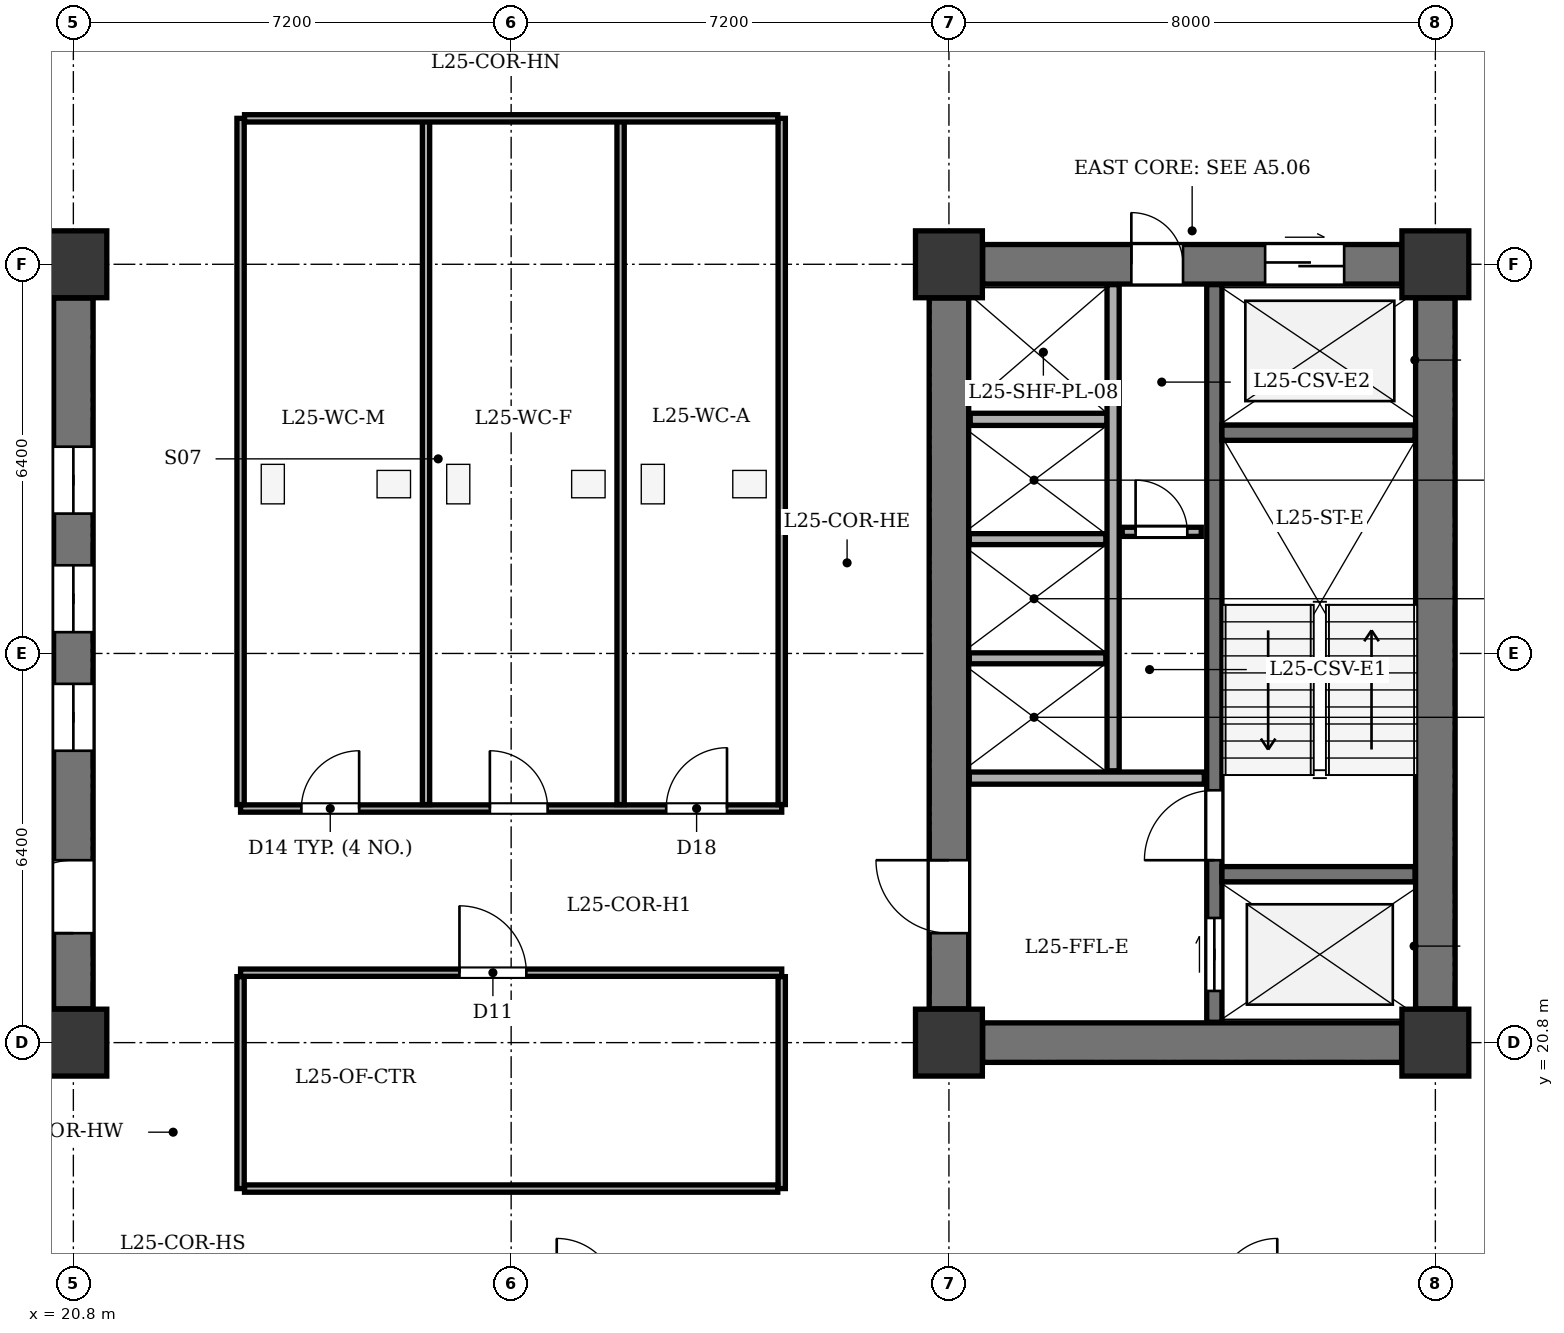
"""IFC4 building model, lengths in metres.
Left out: names, types, materials, properties, quantities, classifications, styles, units other than length and angle.
Written with IfcOpenShell. Run it as: python <this file> out.ifc"""

import sys

from ifc_helpers import new_model, si_unit, direction, frame, frame_2d, origin, origin_2d, place, context, subcontext, project, spatial, rectangle, extrude, element, fill, save


model = new_model("IFC4")
c1 = context("Model", 3, precision=1e-05, world=origin(), true_north=direction((0.0, 1.0)))
c2 = subcontext(c1, "Body", "Model", "MODEL_VIEW")
j1 = project(units=[si_unit("LENGTHUNIT", "METRE"), si_unit("PLANEANGLEUNIT", "RADIAN")], contexts=[c1])
p1 = place(None, origin())
s1 = spatial("IfcSite", under=j1, at=p1, CompositionType="ELEMENT")
p2 = place(p1, origin())
s2 = spatial("IfcBuilding", under=s1, at=p2, CompositionType="ELEMENT")
p3 = place(p2, frame((0.0, 0.0, 102.3)))
s3 = spatial("IfcBuildingStorey", under=s2, at=p3, CompositionType="ELEMENT", Elevation=102.3)
for number, where, z_axis, x_axis in (
    (1, (20.8, 20.8, 0.0), (0.0, 0.0, 1.0), (1.0, 0.0, 0.0)),
    (2, (20.8, 33.6, 0.0), (0.0, 0.0, 1.0), (1.0, 0.0, 0.0)),
    (3, (35.2, 20.8, 0.0), (0.0, 0.0, 1.0), (1.0, 0.0, 0.0)),
    (4, (43.2, 20.8, 0.0), (0.0, 0.0, 1.0), (1.0, 0.0, 0.0)),
    (5, (35.2, 33.6, 0.0), (0.0, 0.0, 1.0), (1.0, 0.0, 0.0)),
    (6, (43.2, 33.6, 0.0), (0.0, 0.0, 1.0), (1.0, 0.0, 0.0)),
):
    element("IfcColumn", number, at=place(p3, frame(where, z_axis=z_axis, x_axis=x_axis)), inside=s3, PredefinedType="COLUMN", context=c2, shape_type="SweptSolid", body=[
        extrude(rectangle(XDim=1.1, YDim=1.1, at=origin_2d()), origin(), (0.0, 0.0, 1.0), 3.9),
    ])
p4 = place(p3, frame((20.8, 21.355, 0.0), z_axis=(0.0, 0.0, 1.0), x_axis=(0.0, 1.0, 0.0)))
e7 = element("IfcWall", 7, at=p4, inside=s3, PredefinedType="SHEAR", context=c2, shape_type="SweptSolid", body=[
    extrude(rectangle(XDim=11.69, YDim=0.65, at=frame_2d((5.845, 0.0))), origin(), (0.0, 0.0, 1.0), 3.6),
])
p5 = place(p4, frame((1.245, 0.0, 0.0)))
e8 = element("IfcOpeningElement", 8, at=p5, cuts=e7, PredefinedType="OPENING", context=c2, shape_type="SweptSolid", body=[
    extrude(rectangle(XDim=1.2, YDim=2.15, at=frame_2d((0.6, 1.075))), frame((0.0, 0.335, 0.0), z_axis=(0.0, -1.0, 0.0), x_axis=(1.0, 0.0, 0.0)), (0.0, 0.0, 1.0), 0.67),
])
p6 = place(p4, frame((4.245, 0.0, 0.0)))
e9 = element("IfcOpeningElement", 9, at=p6, cuts=e7, PredefinedType="OPENING", context=c2, shape_type="SweptSolid", body=[
    extrude(rectangle(XDim=1.1, YDim=2.1, at=frame_2d((0.55, 1.05))), frame((0.0, 0.335, 0.0), z_axis=(0.0, -1.0, 0.0), x_axis=(1.0, 0.0, 0.0)), (0.0, 0.0, 1.0), 0.67),
])
p7 = place(p4, frame((6.195, 0.0, 0.0)))
e10 = element("IfcOpeningElement", 10, at=p7, cuts=e7, PredefinedType="OPENING", context=c2, shape_type="SweptSolid", body=[
    extrude(rectangle(XDim=1.1, YDim=2.1, at=frame_2d((0.55, 1.05))), frame((0.0, 0.335, 0.0), z_axis=(0.0, -1.0, 0.0), x_axis=(1.0, 0.0, 0.0)), (0.0, 0.0, 1.0), 0.67),
])
p8 = place(p4, frame((8.145, 0.0, 0.0)))
e11 = element("IfcOpeningElement", 11, at=p8, cuts=e7, PredefinedType="OPENING", context=c2, shape_type="SweptSolid", body=[
    extrude(rectangle(XDim=1.1, YDim=2.1, at=frame_2d((0.55, 1.05))), frame((0.0, 0.335, 0.0), z_axis=(0.0, -1.0, 0.0), x_axis=(1.0, 0.0, 0.0)), (0.0, 0.0, 1.0), 0.67),
])
p9 = place(p3, frame((16.6, 25.15, 0.0), z_axis=(0.0, 0.0, 1.0), x_axis=(1.0, 0.0, 0.0)))
e12 = element("IfcWall", 12, at=p9, inside=s3, PredefinedType="SOLIDWALL", context=c2, shape_type="SweptSolid", body=[
    extrude(rectangle(XDim=3.865, YDim=0.2, at=frame_2d((1.933, 0.0))), origin(), (0.0, 0.0, 1.0), 3.6),
])
p10 = place(p9, frame((0.3, 0.0, 0.0)))
e13 = element("IfcOpeningElement", 13, at=p10, cuts=e12, PredefinedType="OPENING", context=c2, shape_type="SweptSolid", body=[
    extrude(rectangle(XDim=0.85, YDim=2.02, at=frame_2d((0.425, 1.01))), frame((0.0, 0.11, 0.0), z_axis=(0.0, -1.0, 0.0), x_axis=(1.0, 0.0, 0.0)), (0.0, 0.0, 1.0), 0.22),
])
for number, where, z_axis, x_axis in (
    (14, (18.22, 27.12, 0.0), (0.0, 0.0, 1.0), (1.0, 0.0, 0.0)),
    (15, (18.22, 29.08, 0.0), (0.0, 0.0, 1.0), (1.0, 0.0, 0.0)),
):
    element("IfcWall", number, at=place(p3, frame(where, z_axis=z_axis, x_axis=x_axis)), inside=s3, PredefinedType="PARTITIONING", context=c2, shape_type="SweptSolid", body=[
        extrude(rectangle(XDim=2.245, YDim=0.18, at=frame_2d((1.123, 0.0))), origin(), (0.0, 0.0, 1.0), 3.6),
    ])
p11 = place(p3, frame((43.2, 21.355, 0.0), z_axis=(0.0, 0.0, 1.0), x_axis=(0.0, 1.0, 0.0)))
e16 = element("IfcWall", 16, at=p11, inside=s3, PredefinedType="SHEAR", context=c2, shape_type="SweptSolid", body=[
    extrude(rectangle(XDim=11.69, YDim=0.65, at=frame_2d((5.845, 0.0))), origin(), (0.0, 0.0, 1.0), 3.6),
])
p12 = place(p3, frame((35.755, 20.8, 0.0), z_axis=(0.0, 0.0, 1.0), x_axis=(1.0, 0.0, 0.0)))
e17 = element("IfcWall", 17, at=p12, inside=s3, PredefinedType="SHEAR", context=c2, shape_type="SweptSolid", body=[
    extrude(rectangle(XDim=6.89, YDim=0.65, at=frame_2d((3.445, 0.0))), origin(), (0.0, 0.0, 1.0), 3.6),
])
p13 = place(p3, frame((35.755, 33.6, 0.0), z_axis=(0.0, 0.0, 1.0), x_axis=(1.0, 0.0, 0.0)))
e18 = element("IfcWall", 18, at=p13, inside=s3, PredefinedType="SHEAR", context=c2, shape_type="SweptSolid", body=[
    extrude(rectangle(XDim=6.89, YDim=0.65, at=frame_2d((3.445, 0.0))), origin(), (0.0, 0.0, 1.0), 3.6),
])
p14 = place(p13, frame((4.645, 0.0, 0.0)))
e19 = element("IfcOpeningElement", 19, at=p14, cuts=e18, PredefinedType="OPENING", context=c2, shape_type="SweptSolid", body=[
    extrude(rectangle(XDim=1.3, YDim=2.15, at=frame_2d((0.65, 1.075))), frame((0.0, 0.335, 0.0), z_axis=(0.0, -1.0, 0.0), x_axis=(1.0, 0.0, 0.0)), (0.0, 0.0, 1.0), 0.67),
])
p15 = place(p13, frame((2.445, 0.0, 0.0)))
e20 = element("IfcOpeningElement", 20, at=p15, cuts=e18, PredefinedType="OPENING", context=c2, shape_type="SweptSolid", body=[
    extrude(rectangle(XDim=0.85, YDim=2.02, at=frame_2d((0.425, 1.01))), frame((0.0, 0.335, 0.0), z_axis=(0.0, -1.0, 0.0), x_axis=(1.0, 0.0, 0.0)), (0.0, 0.0, 1.0), 0.67),
])
p16 = place(p3, frame((35.2, 21.355, 0.0), z_axis=(0.0, 0.0, 1.0), x_axis=(0.0, 1.0, 0.0)))
e21 = element("IfcWall", 21, at=p16, inside=s3, PredefinedType="SHEAR", context=c2, shape_type="SweptSolid", body=[
    extrude(rectangle(XDim=11.69, YDim=0.65, at=frame_2d((5.845, 0.0))), origin(), (0.0, 0.0, 1.0), 3.6),
])
p17 = place(p16, frame((1.245, 0.0, 0.0)))
e22 = element("IfcOpeningElement", 22, at=p17, cuts=e21, PredefinedType="OPENING", context=c2, shape_type="SweptSolid", body=[
    extrude(rectangle(XDim=1.2, YDim=2.15, at=frame_2d((0.6, 1.075))), frame((0.0, 0.335, 0.0), z_axis=(0.0, -1.0, 0.0), x_axis=(1.0, 0.0, 0.0)), (0.0, 0.0, 1.0), 0.67),
])
p18 = place(p3, frame((39.565, 21.135, 0.0), z_axis=(0.0, 0.0, 1.0), x_axis=(0.0, 1.0, 0.0)))
e23 = element("IfcWall", 23, at=p18, inside=s3, PredefinedType="SHEAR", context=c2, shape_type="SweptSolid", body=[
    extrude(rectangle(XDim=12.13, YDim=0.25, at=frame_2d((6.065, 0.0))), origin(), (0.0, 0.0, 1.0), 3.6),
])
p19 = place(p18, frame((0.515, 0.0, 0.0)))
e24 = element("IfcOpeningElement", 24, at=p19, cuts=e23, PredefinedType="OPENING", context=c2, shape_type="SweptSolid", body=[
    extrude(rectangle(XDim=1.2, YDim=2.15, at=frame_2d((0.6, 1.075))), frame((0.0, 0.135, 0.0), z_axis=(0.0, -1.0, 0.0), x_axis=(1.0, 0.0, 0.0)), (0.0, 0.0, 1.0), 0.27),
])
p20 = place(p18, frame((2.665, 0.0, 0.0)))
e25 = element("IfcOpeningElement", 25, at=p20, cuts=e23, PredefinedType="OPENING", context=c2, shape_type="SweptSolid", body=[
    extrude(rectangle(XDim=1.15, YDim=2.15, at=frame_2d((0.575, 1.075))), frame((0.0, 0.135, 0.0), z_axis=(0.0, -1.0, 0.0), x_axis=(1.0, 0.0, 0.0)), (0.0, 0.0, 1.0), 0.27),
])
for number, where, z_axis, x_axis in (
    (26, (39.69, 23.57, 0.0), (0.0, 0.0, 1.0), (1.0, 0.0, 0.0)),
    (27, (39.69, 30.83, 0.0), (0.0, 0.0, 1.0), (1.0, 0.0, 0.0)),
):
    element("IfcWall", number, at=place(p3, frame(where, z_axis=z_axis, x_axis=x_axis)), inside=s3, PredefinedType="SHEAR", context=c2, shape_type="SweptSolid", body=[
        extrude(rectangle(XDim=3.175, YDim=0.25, at=frame_2d((1.587, 0.0))), origin(), (0.0, 0.0, 1.0), 3.6),
    ])
p21 = place(p3, frame((35.535, 25.15, 0.0), z_axis=(0.0, 0.0, 1.0), x_axis=(1.0, 0.0, 0.0)))
e28 = element("IfcWall", 28, at=p21, inside=s3, PredefinedType="SOLIDWALL", context=c2, shape_type="SweptSolid", body=[
    extrude(rectangle(XDim=3.865, YDim=0.2, at=frame_2d((1.933, 0.0))), origin(), (0.0, 0.0, 1.0), 3.6),
])
p22 = place(p3, frame((35.55, 31.05, 0.0), z_axis=(0.0, 0.0, 1.0), x_axis=(1.0, 0.0, 0.0)))
e29 = element("IfcWall", 29, at=p22, inside=s3, PredefinedType="SOLIDWALL", context=c2, shape_type="SweptSolid", body=[
    extrude(rectangle(XDim=2.25, YDim=0.2, at=frame_2d((1.125, 0.0))), origin(), (0.0, 0.0, 1.0), 3.6),
])
p23 = place(p3, frame((37.9, 25.27, 0.0), z_axis=(0.0, 0.0, 1.0), x_axis=(0.0, 1.0, 0.0)))
e30 = element("IfcWall", 30, at=p23, inside=s3, PredefinedType="SOLIDWALL", context=c2, shape_type="SweptSolid", body=[
    extrude(rectangle(XDim=7.995, YDim=0.2, at=frame_2d((3.998, 0.0))), origin(), (0.0, 0.0, 1.0), 3.6),
])
for number, where, z_axis, x_axis in (
    (31, (35.535, 27.12, 0.0), (0.0, 0.0, 1.0), (1.0, 0.0, 0.0)),
    (32, (35.535, 29.08, 0.0), (0.0, 0.0, 1.0), (1.0, 0.0, 0.0)),
):
    element("IfcWall", number, at=place(p3, frame(where, z_axis=z_axis, x_axis=x_axis)), inside=s3, PredefinedType="PARTITIONING", context=c2, shape_type="SweptSolid", body=[
        extrude(rectangle(XDim=2.245, YDim=0.18, at=frame_2d((1.123, 0.0))), origin(), (0.0, 0.0, 1.0), 3.6),
    ])
p24 = place(p3, frame((38.05, 29.2, 0.0), z_axis=(0.0, 0.0, 1.0), x_axis=(1.0, 0.0, 0.0)))
e33 = element("IfcWall", 33, at=p24, inside=s3, PredefinedType="PARTITIONING", context=c2, shape_type="SweptSolid", body=[
    extrude(rectangle(XDim=1.3, YDim=0.15, at=frame_2d((0.65, 0.0))), origin(), (0.0, 0.0, 1.0), 3.6),
])
p25 = place(p24, frame((0.22, 0.0, 0.0)))
e34 = element("IfcOpeningElement", 34, at=p25, cuts=e33, PredefinedType="OPENING", context=c2, shape_type="SweptSolid", body=[
    extrude(rectangle(XDim=0.85, YDim=2.02, at=frame_2d((0.425, 1.01))), frame((0.0, 0.085, 0.0), z_axis=(0.0, -1.0, 0.0), x_axis=(1.0, 0.0, 0.0)), (0.0, 0.0, 1.0), 0.17),
])
p26 = place(p3, frame((23.55, 24.65, 0.0), z_axis=(0.0, 0.0, 1.0), x_axis=(1.0, 0.0, 0.0)))
e35 = element("IfcWall", 35, at=p26, inside=s3, PredefinedType="PARTITIONING", context=c2, shape_type="SweptSolid", body=[
    extrude(rectangle(XDim=8.9, YDim=0.12, at=frame_2d((4.45, 0.0))), origin(), (0.0, 0.0, 1.0), 3.135),
])
p27 = place(p26, frame((1.0, 0.0, 0.0)))
e36 = element("IfcOpeningElement", 36, at=p27, cuts=e35, PredefinedType="OPENING", context=c2, shape_type="SweptSolid", body=[
    extrude(rectangle(XDim=0.95, YDim=2.1, at=frame_2d((0.475, 1.05))), frame((0.0, 0.07, 0.0), z_axis=(0.0, -1.0, 0.0), x_axis=(1.0, 0.0, 0.0)), (0.0, 0.0, 1.0), 0.14),
])
p28 = place(p26, frame((4.1, 0.0, 0.0)))
e37 = element("IfcOpeningElement", 37, at=p28, cuts=e35, PredefinedType="OPENING", context=c2, shape_type="SweptSolid", body=[
    extrude(rectangle(XDim=0.95, YDim=2.1, at=frame_2d((0.475, 1.05))), frame((0.0, 0.07, 0.0), z_axis=(0.0, -1.0, 0.0), x_axis=(1.0, 0.0, 0.0)), (0.0, 0.0, 1.0), 0.14),
])
p29 = place(p26, frame((7.0, 0.0, 0.0)))
e38 = element("IfcOpeningElement", 38, at=p29, cuts=e35, PredefinedType="OPENING", context=c2, shape_type="SweptSolid", body=[
    extrude(rectangle(XDim=1.0, YDim=2.1, at=frame_2d((0.5, 1.05))), frame((0.0, 0.07, 0.0), z_axis=(0.0, -1.0, 0.0), x_axis=(1.0, 0.0, 0.0)), (0.0, 0.0, 1.0), 0.14),
])
for number, where, z_axis, x_axis in (
    (39, (23.55, 24.715, 0.0), (0.0, 0.0, 1.0), (0.0, 1.0, 0.0)),
    (40, (32.45, 24.715, 0.0), (0.0, 0.0, 1.0), (0.0, 1.0, 0.0)),
    (41, (26.6, 24.715, 0.0), (0.0, 0.0, 1.0), (0.0, 1.0, 0.0)),
):
    element("IfcWall", number, at=place(p3, frame(where, z_axis=z_axis, x_axis=x_axis)), inside=s3, PredefinedType="PARTITIONING", context=c2, shape_type="SweptSolid", body=[
        extrude(rectangle(XDim=11.285, YDim=0.12, at=frame_2d((5.643, 0.0))), origin(), (0.0, 0.0, 1.0), 3.6),
    ])
p30 = place(p3, frame((29.8, 24.715, 0.0), z_axis=(0.0, 0.0, 1.0), x_axis=(0.0, 1.0, 0.0)))
e42 = element("IfcWall", 42, at=p30, inside=s3, PredefinedType="PARTITIONING", context=c2, shape_type="SweptSolid", body=[
    extrude(rectangle(XDim=11.285, YDim=0.12, at=frame_2d((5.643, 0.0))), origin(), (0.0, 0.0, 1.0), 3.135),
])
p31 = place(p3, frame((23.615, 36.0, 0.0), z_axis=(0.0, 0.0, 1.0), x_axis=(1.0, 0.0, 0.0)))
e43 = element("IfcWall", 43, at=p31, inside=s3, PredefinedType="PARTITIONING", context=c2, shape_type="SweptSolid", body=[
    extrude(rectangle(XDim=8.77, YDim=0.12, at=frame_2d((4.385, 0.0))), origin(), (0.0, 0.0, 1.0), 3.6),
])
p32 = place(p3, frame((23.55, 21.95, 0.0), z_axis=(0.0, 0.0, 1.0), x_axis=(1.0, 0.0, 0.0)))
e44 = element("IfcWall", 44, at=p32, inside=s3, PredefinedType="PARTITIONING", context=c2, shape_type="SweptSolid", body=[
    extrude(rectangle(XDim=8.9, YDim=0.12, at=frame_2d((4.45, 0.0))), origin(), (0.0, 0.0, 1.0), 3.135),
])
p33 = place(p32, frame((3.6, 0.0, 0.0)))
e45 = element("IfcOpeningElement", 45, at=p33, cuts=e44, PredefinedType="OPENING", context=c2, shape_type="SweptSolid", body=[
    extrude(rectangle(XDim=1.1, YDim=2.15, at=frame_2d((0.55, 1.075))), frame((0.0, 0.07, 0.0), z_axis=(0.0, -1.0, 0.0), x_axis=(1.0, 0.0, 0.0)), (0.0, 0.0, 1.0), 0.14),
])
for number, where, z_axis, x_axis in (
    (46, (23.55, 18.4, 0.0), (0.0, 0.0, 1.0), (0.0, 1.0, 0.0)),
    (47, (32.45, 18.4, 0.0), (0.0, 0.0, 1.0), (0.0, 1.0, 0.0)),
):
    element("IfcWall", number, at=place(p3, frame(where, z_axis=z_axis, x_axis=x_axis)), inside=s3, PredefinedType="PARTITIONING", context=c2, shape_type="SweptSolid", body=[
        extrude(rectangle(XDim=3.485, YDim=0.12, at=frame_2d((1.743, 0.0))), origin(), (0.0, 0.0, 1.0), 3.6),
    ])
p34 = place(p3, frame((23.615, 18.4, 0.0), z_axis=(0.0, 0.0, 1.0), x_axis=(1.0, 0.0, 0.0)))
e48 = element("IfcWall", 48, at=p34, inside=s3, PredefinedType="PARTITIONING", context=c2, shape_type="SweptSolid", body=[
    extrude(rectangle(XDim=8.77, YDim=0.12, at=frame_2d((4.385, 0.0))), origin(), (0.0, 0.0, 1.0), 3.6),
])
p35 = place(p5, origin())
e49 = element("IfcDoor", 49, at=p35, inside=s3, OperationType="SINGLE_SWING_LEFT", PredefinedType="DOOR", context=c2, shape_type="SweptSolid", body=[
    extrude(rectangle(XDim=1.2, YDim=2.15, at=frame_2d((0.6, 1.075))), frame((0.0, 0.025, 0.0), z_axis=(0.0, -1.0, 0.0), x_axis=(1.0, 0.0, 0.0)), (0.0, 0.0, 1.0), 0.05),
])
fill(e8, e49)
p36 = place(p6, origin())
e50 = element("IfcDoor", 50, at=p36, inside=s3, OperationType="DOUBLE_DOOR_SLIDING", PredefinedType="DOOR", context=c2, shape_type="SweptSolid", body=[
    extrude(rectangle(XDim=1.1, YDim=2.1, at=frame_2d((0.55, 1.05))), frame((0.0, 0.025, 0.0), z_axis=(0.0, -1.0, 0.0), x_axis=(1.0, 0.0, 0.0)), (0.0, 0.0, 1.0), 0.05),
])
fill(e9, e50)
p37 = place(p7, origin())
e51 = element("IfcDoor", 51, at=p37, inside=s3, OperationType="DOUBLE_DOOR_SLIDING", PredefinedType="DOOR", context=c2, shape_type="SweptSolid", body=[
    extrude(rectangle(XDim=1.1, YDim=2.1, at=frame_2d((0.55, 1.05))), frame((0.0, 0.025, 0.0), z_axis=(0.0, -1.0, 0.0), x_axis=(1.0, 0.0, 0.0)), (0.0, 0.0, 1.0), 0.05),
])
fill(e10, e51)
p38 = place(p8, origin())
e52 = element("IfcDoor", 52, at=p38, inside=s3, OperationType="DOUBLE_DOOR_SLIDING", PredefinedType="DOOR", context=c2, shape_type="SweptSolid", body=[
    extrude(rectangle(XDim=1.1, YDim=2.1, at=frame_2d((0.55, 1.05))), frame((0.0, 0.025, 0.0), z_axis=(0.0, -1.0, 0.0), x_axis=(1.0, 0.0, 0.0)), (0.0, 0.0, 1.0), 0.05),
])
fill(e11, e52)
p39 = place(p14, origin())
e53 = element("IfcDoor", 53, at=p39, inside=s3, OperationType="DOUBLE_DOOR_SLIDING", PredefinedType="DOOR", context=c2, shape_type="SweptSolid", body=[
    extrude(rectangle(XDim=1.3, YDim=2.15, at=frame_2d((0.65, 1.075))), frame((0.0, 0.025, 0.0), z_axis=(0.0, -1.0, 0.0), x_axis=(1.0, 0.0, 0.0)), (0.0, 0.0, 1.0), 0.05),
])
fill(e19, e53)
p40 = place(p15, origin())
e54 = element("IfcDoor", 54, at=p40, inside=s3, OperationType="SINGLE_SWING_LEFT", PredefinedType="DOOR", context=c2, shape_type="SweptSolid", body=[
    extrude(rectangle(XDim=0.85, YDim=2.02, at=frame_2d((0.425, 1.01))), frame((0.0, 0.025, 0.0), z_axis=(0.0, -1.0, 0.0), x_axis=(1.0, 0.0, 0.0)), (0.0, 0.0, 1.0), 0.05),
])
fill(e20, e54)
p41 = place(p17, origin())
e55 = element("IfcDoor", 55, at=p41, inside=s3, OperationType="SINGLE_SWING_RIGHT", PredefinedType="DOOR", context=c2, shape_type="SweptSolid", body=[
    extrude(rectangle(XDim=1.2, YDim=2.15, at=frame_2d((0.6, 1.075))), frame((0.0, 0.025, 0.0), z_axis=(0.0, -1.0, 0.0), x_axis=(1.0, 0.0, 0.0)), (0.0, 0.0, 1.0), 0.05),
])
fill(e22, e55)
p42 = place(p19, origin())
e56 = element("IfcDoor", 56, at=p42, inside=s3, OperationType="DOUBLE_DOOR_SLIDING", PredefinedType="DOOR", context=c2, shape_type="SweptSolid", body=[
    extrude(rectangle(XDim=1.2, YDim=2.15, at=frame_2d((0.6, 1.075))), frame((0.0, 0.025, 0.0), z_axis=(0.0, -1.0, 0.0), x_axis=(1.0, 0.0, 0.0)), (0.0, 0.0, 1.0), 0.05),
])
fill(e24, e56)
p43 = place(p20, origin())
e57 = element("IfcDoor", 57, at=p43, inside=s3, OperationType="SINGLE_SWING_LEFT", PredefinedType="DOOR", context=c2, shape_type="SweptSolid", body=[
    extrude(rectangle(XDim=1.15, YDim=2.15, at=frame_2d((0.575, 1.075))), frame((0.0, 0.025, 0.0), z_axis=(0.0, -1.0, 0.0), x_axis=(1.0, 0.0, 0.0)), (0.0, 0.0, 1.0), 0.05),
])
fill(e25, e57)
p44 = place(p25, origin())
e58 = element("IfcDoor", 58, at=p44, inside=s3, OperationType="SINGLE_SWING_LEFT", PredefinedType="DOOR", context=c2, shape_type="SweptSolid", body=[
    extrude(rectangle(XDim=0.85, YDim=2.02, at=frame_2d((0.425, 1.01))), frame((0.0, 0.025, 0.0), z_axis=(0.0, -1.0, 0.0), x_axis=(1.0, 0.0, 0.0)), (0.0, 0.0, 1.0), 0.05),
])
fill(e34, e58)
p45 = place(p27, origin())
e59 = element("IfcDoor", 59, at=p45, inside=s3, OperationType="SINGLE_SWING_RIGHT", PredefinedType="DOOR", context=c2, shape_type="SweptSolid", body=[
    extrude(rectangle(XDim=0.95, YDim=2.1, at=frame_2d((0.475, 1.05))), frame((0.0, 0.025, 0.0), z_axis=(0.0, -1.0, 0.0), x_axis=(1.0, 0.0, 0.0)), (0.0, 0.0, 1.0), 0.05),
])
fill(e36, e59)
p46 = place(p28, origin())
e60 = element("IfcDoor", 60, at=p46, inside=s3, OperationType="SINGLE_SWING_LEFT", PredefinedType="DOOR", context=c2, shape_type="SweptSolid", body=[
    extrude(rectangle(XDim=0.95, YDim=2.1, at=frame_2d((0.475, 1.05))), frame((0.0, 0.025, 0.0), z_axis=(0.0, -1.0, 0.0), x_axis=(1.0, 0.0, 0.0)), (0.0, 0.0, 1.0), 0.05),
])
fill(e37, e60)
p47 = place(p29, origin())
e61 = element("IfcDoor", 61, at=p47, inside=s3, OperationType="SINGLE_SWING_RIGHT", PredefinedType="DOOR", context=c2, shape_type="SweptSolid", body=[
    extrude(rectangle(XDim=1.0, YDim=2.1, at=frame_2d((0.5, 1.05))), frame((0.0, 0.025, 0.0), z_axis=(0.0, -1.0, 0.0), x_axis=(1.0, 0.0, 0.0)), (0.0, 0.0, 1.0), 0.05),
])
fill(e38, e61)
p48 = place(p33, origin())
e62 = element("IfcDoor", 62, at=p48, inside=s3, OperationType="SINGLE_SWING_LEFT", PredefinedType="DOOR", context=c2, shape_type="SweptSolid", body=[
    extrude(rectangle(XDim=1.1, YDim=2.15, at=frame_2d((0.55, 1.075))), frame((0.0, 0.025, 0.0), z_axis=(0.0, -1.0, 0.0), x_axis=(1.0, 0.0, 0.0)), (0.0, 0.0, 1.0), 0.05),
])
fill(e45, e62)
save(model, sys.argv[1])
